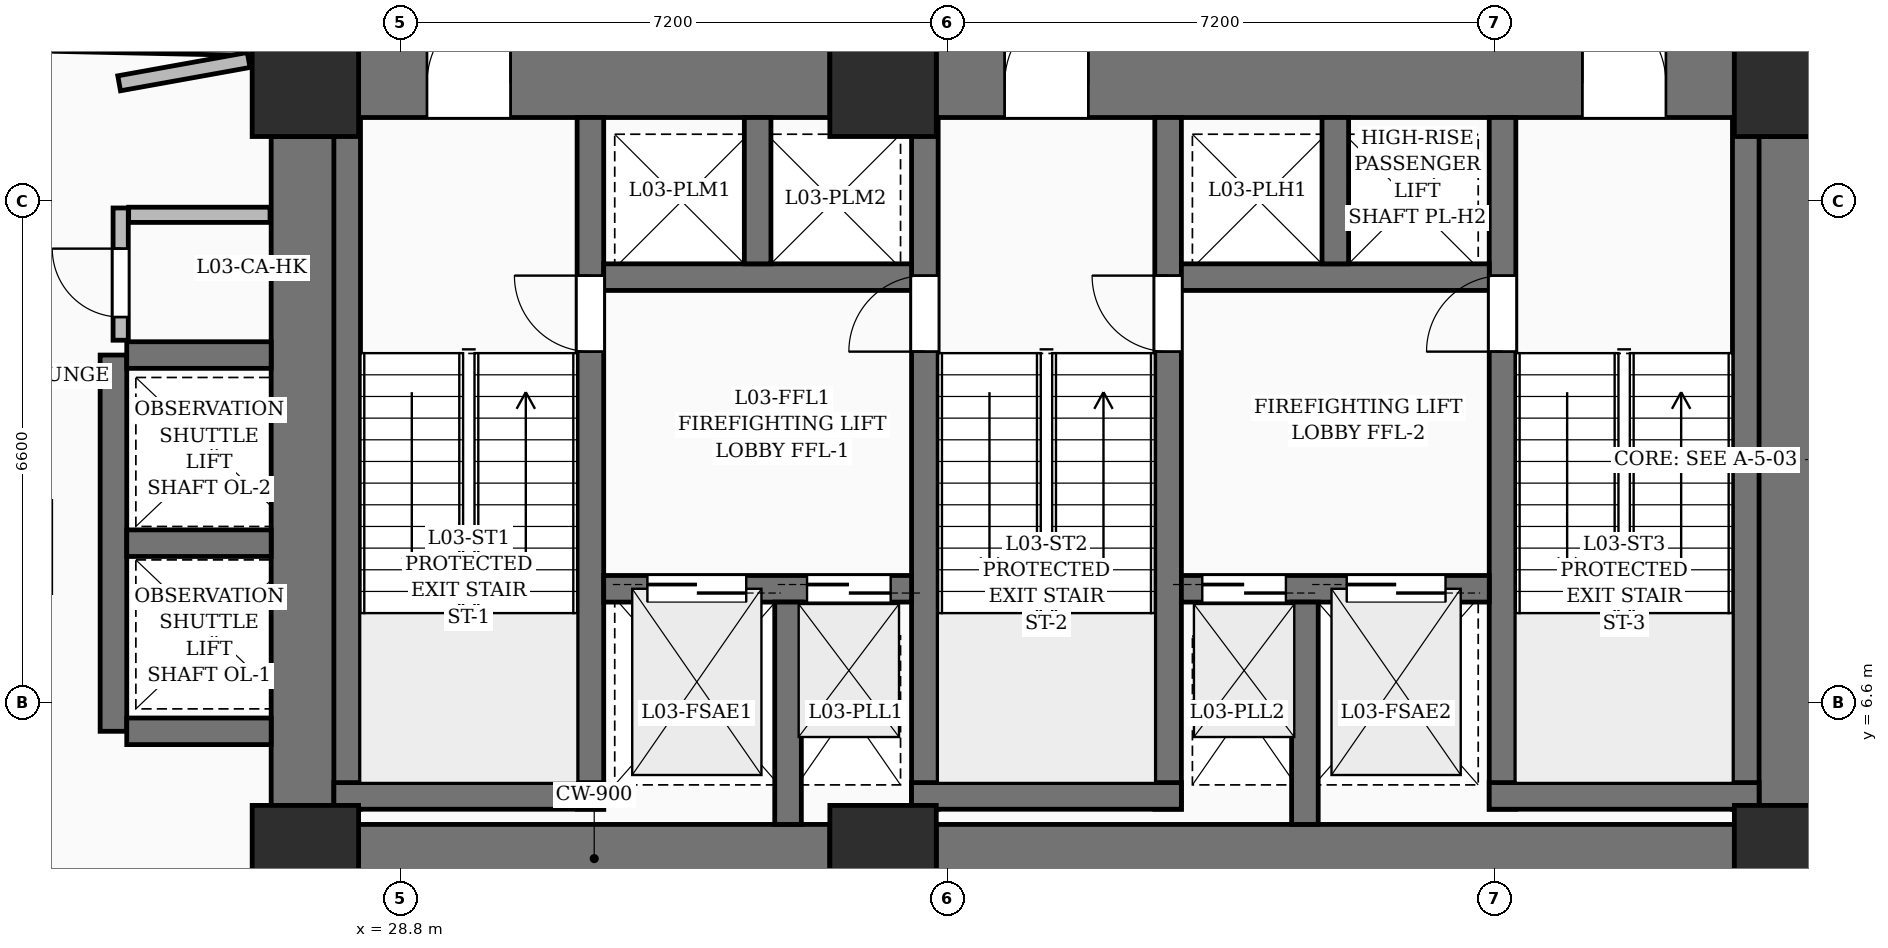
"""IFC4 building model, lengths in metres.
Left out: names, types, materials, properties, quantities, classifications, styles, units other than length and angle.
Written with IfcOpenShell. Run it as: python <this file> out.ifc"""

import sys

from ifc_helpers import new_model, si_unit, direction, frame, frame_2d, origin, origin_2d, place, context, subcontext, project, spatial, rectangle, extrude, element, fill, save


model = new_model("IFC4")
c1 = context("Model", 3, precision=1e-05, world=origin(), true_north=direction((0.0, 1.0)))
c2 = subcontext(c1, "Body", "Model", "MODEL_VIEW")
j1 = project(units=[si_unit("LENGTHUNIT", "METRE"), si_unit("PLANEANGLEUNIT", "RADIAN")], contexts=[c1])
p1 = place(None, origin())
s1 = spatial("IfcSite", under=j1, at=p1, CompositionType="ELEMENT")
p2 = place(p1, origin())
s2 = spatial("IfcBuilding", under=s1, at=p2, CompositionType="ELEMENT")
p3 = place(p2, frame((0.0, 0.0, 17.4)))
s3 = spatial("IfcBuildingStorey", under=s2, at=p3, CompositionType="ELEMENT", Elevation=17.4)
for number, where, z_axis, x_axis in (
    (1, (27.55, 4.55, 0.0), (0.0, 0.0, 1.0), (1.0, 0.0, 0.0)),
    (2, (35.15, 4.55, 0.0), (0.0, 0.0, 1.0), (1.0, 0.0, 0.0)),
    (3, (47.05, 4.55, 0.0), (0.0, 0.0, 1.0), (1.0, 0.0, 0.0)),
    (4, (27.55, 14.75, 0.0), (0.0, 0.0, 1.0), (1.0, 0.0, 0.0)),
    (5, (35.15, 14.75, 0.0), (0.0, 0.0, 1.0), (1.0, 0.0, 0.0)),
    (6, (47.05, 14.75, 0.0), (0.0, 0.0, 1.0), (1.0, 0.0, 0.0)),
):
    element("IfcColumn", number, at=place(p3, frame(where, z_axis=z_axis, x_axis=x_axis)), inside=s3, PredefinedType="COLUMN", context=c2, shape_type="SweptSolid", body=[
        extrude(rectangle(XDim=1.4, YDim=1.4, at=origin_2d()), origin(), (0.0, 0.0, 1.0), 4.5),
    ])
p4 = place(p3, frame((28.25, 4.55, 0.0), z_axis=(0.0, 0.0, 1.0), x_axis=(1.0, 0.0, 0.0)))
e7 = element("IfcWall", 7, at=p4, inside=s3, PredefinedType="SHEAR", context=c2, shape_type="SweptSolid", body=[
    extrude(rectangle(XDim=6.2, YDim=0.9, at=frame_2d((3.1, 0.0))), origin(), (0.0, 0.0, 1.0), 4.5),
])
p5 = place(p3, frame((35.85, 4.55, 0.0), z_axis=(0.0, 0.0, 1.0), x_axis=(1.0, 0.0, 0.0)))
e8 = element("IfcWall", 8, at=p5, inside=s3, PredefinedType="SHEAR", context=c2, shape_type="SweptSolid", body=[
    extrude(rectangle(XDim=10.5, YDim=0.9, at=frame_2d((5.25, 0.0))), origin(), (0.0, 0.0, 1.0), 4.5),
])
p6 = place(p3, frame((28.25, 14.75, 0.0), z_axis=(0.0, 0.0, 1.0), x_axis=(1.0, 0.0, 0.0)))
e9 = element("IfcWall", 9, at=p6, inside=s3, PredefinedType="SHEAR", context=c2, shape_type="SweptSolid", body=[
    extrude(rectangle(XDim=6.2, YDim=0.9, at=frame_2d((3.1, 0.0))), origin(), (0.0, 0.0, 1.0), 4.5),
])
p7 = place(p6, frame((0.9, 0.0, 0.0)))
e10 = element("IfcOpeningElement", 10, at=p7, cuts=e9, PredefinedType="OPENING", context=c2, shape_type="SweptSolid", body=[
    extrude(rectangle(XDim=1.1, YDim=2.2, at=frame_2d((0.55, 1.1))), frame((0.0, 0.46, 0.0), z_axis=(0.0, -1.0, 0.0), x_axis=(1.0, 0.0, 0.0)), (0.0, 0.0, 1.0), 0.92),
])
p8 = place(p3, frame((35.85, 14.75, 0.0), z_axis=(0.0, 0.0, 1.0), x_axis=(1.0, 0.0, 0.0)))
e11 = element("IfcWall", 11, at=p8, inside=s3, PredefinedType="SHEAR", context=c2, shape_type="SweptSolid", body=[
    extrude(rectangle(XDim=10.5, YDim=0.9, at=frame_2d((5.25, 0.0))), origin(), (0.0, 0.0, 1.0), 4.5),
])
p9 = place(p8, frame((0.9, 0.0, 0.0)))
e12 = element("IfcOpeningElement", 12, at=p9, cuts=e11, PredefinedType="OPENING", context=c2, shape_type="SweptSolid", body=[
    extrude(rectangle(XDim=1.1, YDim=2.2, at=frame_2d((0.55, 1.1))), frame((0.0, 0.46, 0.0), z_axis=(0.0, -1.0, 0.0), x_axis=(1.0, 0.0, 0.0)), (0.0, 0.0, 1.0), 0.92),
])
p10 = place(p8, frame((8.5, 0.0, 0.0)))
e13 = element("IfcOpeningElement", 13, at=p10, cuts=e11, PredefinedType="OPENING", context=c2, shape_type="SweptSolid", body=[
    extrude(rectangle(XDim=1.1, YDim=2.2, at=frame_2d((0.55, 1.1))), frame((0.0, 0.46, 0.0), z_axis=(0.0, -1.0, 0.0), x_axis=(1.0, 0.0, 0.0)), (0.0, 0.0, 1.0), 0.92),
])
for number, where, z_axis, x_axis in (
    (14, (27.55, 5.25, 0.0), (0.0, 0.0, 1.0), (0.0, 1.0, 0.0)),
    (15, (47.05, 5.25, 0.0), (0.0, 0.0, 1.0), (0.0, 1.0, 0.0)),
):
    element("IfcWall", number, at=place(p3, frame(where, z_axis=z_axis, x_axis=x_axis)), inside=s3, PredefinedType="SHEAR", context=c2, shape_type="SweptSolid", body=[
        extrude(rectangle(XDim=8.8, YDim=0.9, at=frame_2d((4.4, 0.0))), origin(), (0.0, 0.0, 1.0), 4.5),
    ])
p11 = place(p3, frame((28.1, 5.2, 0.0), z_axis=(0.0, 0.0, 1.0), x_axis=(0.0, 1.0, 0.0)))
e16 = element("IfcWall", 16, at=p11, inside=s3, PredefinedType="SOLIDWALL", context=c2, shape_type="SweptSolid", body=[
    extrude(rectangle(XDim=9.1, YDim=0.35, at=frame_2d((4.55, 0.0))), origin(), (0.0, 0.0, 1.0), 4.5),
])
p12 = place(p3, frame((31.3, 5.2, 0.0), z_axis=(0.0, 0.0, 1.0), x_axis=(0.0, 1.0, 0.0)))
e17 = element("IfcWall", 17, at=p12, inside=s3, PredefinedType="SOLIDWALL", context=c2, shape_type="SweptSolid", body=[
    extrude(rectangle(XDim=9.1, YDim=0.35, at=frame_2d((4.55, 0.0))), origin(), (0.0, 0.0, 1.0), 4.5),
])
p13 = place(p12, frame((6.02, 0.0, 0.0)))
e18 = element("IfcOpeningElement", 18, at=p13, cuts=e17, PredefinedType="OPENING", context=c2, shape_type="SweptSolid", body=[
    extrude(rectangle(XDim=1.0, YDim=2.15, at=frame_2d((0.5, 1.075))), frame((0.0, 0.185, 0.0), z_axis=(0.0, -1.0, 0.0), x_axis=(1.0, 0.0, 0.0)), (0.0, 0.0, 1.0), 0.37),
])
p14 = place(p3, frame((27.925, 5.375, 0.0), z_axis=(0.0, 0.0, 1.0), x_axis=(1.0, 0.0, 0.0)))
e19 = element("IfcWall", 19, at=p14, inside=s3, PredefinedType="SOLIDWALL", context=c2, shape_type="SweptSolid", body=[
    extrude(rectangle(XDim=3.55, YDim=0.35, at=frame_2d((1.775, 0.0))), origin(), (0.0, 0.0, 1.0), 4.5),
])
p15 = place(p3, frame((35.7, 5.2, 0.0), z_axis=(0.0, 0.0, 1.0), x_axis=(0.0, 1.0, 0.0)))
e20 = element("IfcWall", 20, at=p15, inside=s3, PredefinedType="SOLIDWALL", context=c2, shape_type="SweptSolid", body=[
    extrude(rectangle(XDim=9.1, YDim=0.35, at=frame_2d((4.55, 0.0))), origin(), (0.0, 0.0, 1.0), 4.5),
])
p16 = place(p15, frame((6.02, 0.0, 0.0)))
e21 = element("IfcOpeningElement", 21, at=p16, cuts=e20, PredefinedType="OPENING", context=c2, shape_type="SweptSolid", body=[
    extrude(rectangle(XDim=1.0, YDim=2.15, at=frame_2d((0.5, 1.075))), frame((0.0, 0.185, 0.0), z_axis=(0.0, -1.0, 0.0), x_axis=(1.0, 0.0, 0.0)), (0.0, 0.0, 1.0), 0.37),
])
p17 = place(p3, frame((38.9, 5.2, 0.0), z_axis=(0.0, 0.0, 1.0), x_axis=(0.0, 1.0, 0.0)))
e22 = element("IfcWall", 22, at=p17, inside=s3, PredefinedType="SOLIDWALL", context=c2, shape_type="SweptSolid", body=[
    extrude(rectangle(XDim=9.1, YDim=0.35, at=frame_2d((4.55, 0.0))), origin(), (0.0, 0.0, 1.0), 4.5),
])
p18 = place(p17, frame((6.02, 0.0, 0.0)))
e23 = element("IfcOpeningElement", 23, at=p18, cuts=e22, PredefinedType="OPENING", context=c2, shape_type="SweptSolid", body=[
    extrude(rectangle(XDim=1.0, YDim=2.15, at=frame_2d((0.5, 1.075))), frame((0.0, 0.185, 0.0), z_axis=(0.0, -1.0, 0.0), x_axis=(1.0, 0.0, 0.0)), (0.0, 0.0, 1.0), 0.37),
])
p19 = place(p3, frame((35.525, 5.375, 0.0), z_axis=(0.0, 0.0, 1.0), x_axis=(1.0, 0.0, 0.0)))
e24 = element("IfcWall", 24, at=p19, inside=s3, PredefinedType="SOLIDWALL", context=c2, shape_type="SweptSolid", body=[
    extrude(rectangle(XDim=3.55, YDim=0.35, at=frame_2d((1.775, 0.0))), origin(), (0.0, 0.0, 1.0), 4.5),
])
p20 = place(p3, frame((43.3, 5.2, 0.0), z_axis=(0.0, 0.0, 1.0), x_axis=(0.0, 1.0, 0.0)))
e25 = element("IfcWall", 25, at=p20, inside=s3, PredefinedType="SOLIDWALL", context=c2, shape_type="SweptSolid", body=[
    extrude(rectangle(XDim=9.1, YDim=0.35, at=frame_2d((4.55, 0.0))), origin(), (0.0, 0.0, 1.0), 4.5),
])
p21 = place(p20, frame((6.02, 0.0, 0.0)))
e26 = element("IfcOpeningElement", 26, at=p21, cuts=e25, PredefinedType="OPENING", context=c2, shape_type="SweptSolid", body=[
    extrude(rectangle(XDim=1.0, YDim=2.15, at=frame_2d((0.5, 1.075))), frame((0.0, 0.185, 0.0), z_axis=(0.0, -1.0, 0.0), x_axis=(1.0, 0.0, 0.0)), (0.0, 0.0, 1.0), 0.37),
])
p22 = place(p3, frame((46.5, 5.2, 0.0), z_axis=(0.0, 0.0, 1.0), x_axis=(0.0, 1.0, 0.0)))
e27 = element("IfcWall", 27, at=p22, inside=s3, PredefinedType="SOLIDWALL", context=c2, shape_type="SweptSolid", body=[
    extrude(rectangle(XDim=9.1, YDim=0.35, at=frame_2d((4.55, 0.0))), origin(), (0.0, 0.0, 1.0), 4.5),
])
p23 = place(p3, frame((43.125, 5.375, 0.0), z_axis=(0.0, 0.0, 1.0), x_axis=(1.0, 0.0, 0.0)))
e28 = element("IfcWall", 28, at=p23, inside=s3, PredefinedType="SOLIDWALL", context=c2, shape_type="SweptSolid", body=[
    extrude(rectangle(XDim=3.55, YDim=0.35, at=frame_2d((1.775, 0.0))), origin(), (0.0, 0.0, 1.0), 4.5),
])
p24 = place(p3, frame((31.475, 8.1, 0.0), z_axis=(0.0, 0.0, 1.0), x_axis=(1.0, 0.0, 0.0)))
e29 = element("IfcWall", 29, at=p24, inside=s3, PredefinedType="SOLIDWALL", context=c2, shape_type="SweptSolid", body=[
    extrude(rectangle(XDim=4.05, YDim=0.35, at=frame_2d((2.025, 0.0))), origin(), (0.0, 0.0, 1.0), 4.5),
])
p25 = place(p24, frame((0.575, 0.0, 0.0)))
e30 = element("IfcOpeningElement", 30, at=p25, cuts=e29, PredefinedType="OPENING", context=c2, shape_type="SweptSolid", body=[
    extrude(rectangle(XDim=1.3, YDim=2.25, at=frame_2d((0.65, 1.125))), frame((0.0, 0.185, 0.0), z_axis=(0.0, -1.0, 0.0), x_axis=(1.0, 0.0, 0.0)), (0.0, 0.0, 1.0), 0.37),
])
p26 = place(p24, frame((2.675, 0.0, 0.0)))
e31 = element("IfcOpeningElement", 31, at=p26, cuts=e29, PredefinedType="OPENING", context=c2, shape_type="SweptSolid", body=[
    extrude(rectangle(XDim=1.1, YDim=2.2, at=frame_2d((0.55, 1.1))), frame((0.0, 0.185, 0.0), z_axis=(0.0, -1.0, 0.0), x_axis=(1.0, 0.0, 0.0)), (0.0, 0.0, 1.0), 0.37),
])
p27 = place(p3, frame((39.075, 8.1, 0.0), z_axis=(0.0, 0.0, 1.0), x_axis=(1.0, 0.0, 0.0)))
e32 = element("IfcWall", 32, at=p27, inside=s3, PredefinedType="SOLIDWALL", context=c2, shape_type="SweptSolid", body=[
    extrude(rectangle(XDim=4.05, YDim=0.35, at=frame_2d((2.025, 0.0))), origin(), (0.0, 0.0, 1.0), 4.5),
])
p28 = place(p27, frame((2.175, 0.0, 0.0)))
e33 = element("IfcOpeningElement", 33, at=p28, cuts=e32, PredefinedType="OPENING", context=c2, shape_type="SweptSolid", body=[
    extrude(rectangle(XDim=1.3, YDim=2.25, at=frame_2d((0.65, 1.125))), frame((0.0, 0.185, 0.0), z_axis=(0.0, -1.0, 0.0), x_axis=(1.0, 0.0, 0.0)), (0.0, 0.0, 1.0), 0.37),
])
p29 = place(p27, frame((0.275, 0.0, 0.0)))
e34 = element("IfcOpeningElement", 34, at=p29, cuts=e32, PredefinedType="OPENING", context=c2, shape_type="SweptSolid", body=[
    extrude(rectangle(XDim=1.1, YDim=2.2, at=frame_2d((0.55, 1.1))), frame((0.0, 0.185, 0.0), z_axis=(0.0, -1.0, 0.0), x_axis=(1.0, 0.0, 0.0)), (0.0, 0.0, 1.0), 0.37),
])
for number, where, z_axis, x_axis in (
    (35, (33.9, 5.0, 0.0), (0.0, 0.0, 1.0), (0.0, 1.0, 0.0)),
    (36, (40.7, 5.0, 0.0), (0.0, 0.0, 1.0), (0.0, 1.0, 0.0)),
):
    element("IfcWall", number, at=place(p3, frame(where, z_axis=z_axis, x_axis=x_axis)), inside=s3, PredefinedType="SOLIDWALL", context=c2, shape_type="SweptSolid", body=[
        extrude(rectangle(XDim=2.925, YDim=0.35, at=frame_2d((1.462, 0.0))), origin(), (0.0, 0.0, 1.0), 4.5),
    ])
p30 = place(p3, frame((31.475, 12.2, 0.0), z_axis=(0.0, 0.0, 1.0), x_axis=(1.0, 0.0, 0.0)))
e37 = element("IfcWall", 37, at=p30, inside=s3, PredefinedType="SOLIDWALL", context=c2, shape_type="SweptSolid", body=[
    extrude(rectangle(XDim=4.05, YDim=0.35, at=frame_2d((2.025, 0.0))), origin(), (0.0, 0.0, 1.0), 4.5),
])
p31 = place(p3, frame((33.5, 12.375, 0.0), z_axis=(0.0, 0.0, 1.0), x_axis=(0.0, 1.0, 0.0)))
e38 = element("IfcWall", 38, at=p31, inside=s3, PredefinedType="SOLIDWALL", context=c2, shape_type="SweptSolid", body=[
    extrude(rectangle(XDim=1.925, YDim=0.35, at=frame_2d((0.962, 0.0))), origin(), (0.0, 0.0, 1.0), 4.5),
])
p32 = place(p3, frame((39.075, 12.2, 0.0), z_axis=(0.0, 0.0, 1.0), x_axis=(1.0, 0.0, 0.0)))
e39 = element("IfcWall", 39, at=p32, inside=s3, PredefinedType="SOLIDWALL", context=c2, shape_type="SweptSolid", body=[
    extrude(rectangle(XDim=4.05, YDim=0.35, at=frame_2d((2.025, 0.0))), origin(), (0.0, 0.0, 1.0), 4.5),
])
p33 = place(p3, frame((41.1, 12.375, 0.0), z_axis=(0.0, 0.0, 1.0), x_axis=(0.0, 1.0, 0.0)))
e40 = element("IfcWall", 40, at=p33, inside=s3, PredefinedType="SOLIDWALL", context=c2, shape_type="SweptSolid", body=[
    extrude(rectangle(XDim=1.925, YDim=0.35, at=frame_2d((0.962, 0.0))), origin(), (0.0, 0.0, 1.0), 4.5),
])
p34 = place(p3, frame((25.025, 6.225, 0.0), z_axis=(0.0, 0.0, 1.0), x_axis=(0.0, 1.0, 0.0)))
e41 = element("IfcWall", 41, at=p34, inside=s3, PredefinedType="SOLIDWALL", context=c2, shape_type="SweptSolid", body=[
    extrude(rectangle(XDim=4.95, YDim=0.35, at=frame_2d((2.475, 0.0))), origin(), (0.0, 0.0, 1.0), 4.5),
])
for number, where, z_axis, x_axis in (
    (42, (25.2, 6.225, 0.0), (0.0, 0.0, 1.0), (1.0, 0.0, 0.0)),
    (43, (25.2, 8.7, 0.0), (0.0, 0.0, 1.0), (1.0, 0.0, 0.0)),
    (44, (25.2, 11.175, 0.0), (0.0, 0.0, 1.0), (1.0, 0.0, 0.0)),
):
    element("IfcWall", number, at=place(p3, frame(where, z_axis=z_axis, x_axis=x_axis)), inside=s3, PredefinedType="SOLIDWALL", context=c2, shape_type="SweptSolid", body=[
        extrude(rectangle(XDim=1.9, YDim=0.35, at=frame_2d((0.95, 0.0))), origin(), (0.0, 0.0, 1.0), 4.5),
    ])
p35 = place(p3, frame((25.12, 11.37, 0.0), z_axis=(0.0, 0.0, 1.0), x_axis=(0.0, 1.0, 0.0)))
e45 = element("IfcWall", 45, at=p35, inside=s3, PredefinedType="PARTITIONING", context=c2, shape_type="SweptSolid", body=[
    extrude(rectangle(XDim=1.74, YDim=0.2, at=frame_2d((0.87, 0.0))), origin(), (0.0, 0.0, 1.0), 4.2),
])
p36 = place(p35, frame((0.305, 0.0, 0.0)))
e46 = element("IfcOpeningElement", 46, at=p36, cuts=e45, PredefinedType="OPENING", context=c2, shape_type="SweptSolid", body=[
    extrude(rectangle(XDim=0.9, YDim=2.1, at=frame_2d((0.45, 1.05))), frame((0.0, 0.11, 0.0), z_axis=(0.0, -1.0, 0.0), x_axis=(1.0, 0.0, 0.0)), (0.0, 0.0, 1.0), 0.22),
])
p37 = place(p3, frame((25.225, 13.02, 0.0), z_axis=(0.0, 0.0, 1.0), x_axis=(1.0, 0.0, 0.0)))
e47 = element("IfcWall", 47, at=p37, inside=s3, PredefinedType="PARTITIONING", context=c2, shape_type="SweptSolid", body=[
    extrude(rectangle(XDim=1.86, YDim=0.2, at=frame_2d((0.93, 0.0))), origin(), (0.0, 0.0, 1.0), 4.2),
])
p38 = place(p3, frame((20.5, 15.35, 0.0), z_axis=(0.0, 0.0, 1.0), x_axis=(0.999776475021, -0.021142374394, 0.0)))
e48 = element("IfcWall", 48, at=p38, inside=s3, PredefinedType="PARTITIONING", context=c2, shape_type="SweptSolid", body=[
    extrude(rectangle(XDim=7.102, YDim=0.2, at=frame_2d((3.551, 0.0))), origin(), (0.0, 0.0, 1.0), 3.078),
])
p39 = place(p38, frame((3.101, 0.0, 0.0)))
e49 = element("IfcOpeningElement", 49, at=p39, cuts=e48, PredefinedType="OPENING", context=c2, shape_type="SweptSolid", body=[
    extrude(rectangle(XDim=0.9, YDim=2.1, at=frame_2d((0.45, 1.05))), frame((0.0, 0.11, 0.0), z_axis=(0.0, -1.0, 0.0), x_axis=(1.0, 0.0, 0.0)), (0.0, 0.0, 1.0), 0.22),
])
p40 = place(p3, frame((25.1, 14.75, 0.0), z_axis=(0.0, 0.0, 1.0), x_axis=(0.984164140642, 0.177259539302, 0.0)))
e50 = element("IfcWall", 50, at=p40, inside=s3, PredefinedType="PARTITIONING", context=c2, shape_type="SweptSolid", body=[
    extrude(rectangle(XDim=1.731, YDim=0.2, at=frame_2d((0.866, 0.0))), origin(), (0.0, 0.0, 1.0), 3.078),
])
p41 = place(p7, origin())
e51 = element("IfcDoor", 51, at=p41, inside=s3, OperationType="SINGLE_SWING_RIGHT", PredefinedType="DOOR", context=c2, shape_type="SweptSolid", body=[
    extrude(rectangle(XDim=1.1, YDim=2.2, at=frame_2d((0.55, 1.1))), frame((0.0, 0.025, 0.0), z_axis=(0.0, -1.0, 0.0), x_axis=(1.0, 0.0, 0.0)), (0.0, 0.0, 1.0), 0.05),
])
fill(e10, e51)
p42 = place(p9, origin())
e52 = element("IfcDoor", 52, at=p42, inside=s3, OperationType="SINGLE_SWING_RIGHT", PredefinedType="DOOR", context=c2, shape_type="SweptSolid", body=[
    extrude(rectangle(XDim=1.1, YDim=2.2, at=frame_2d((0.55, 1.1))), frame((0.0, 0.025, 0.0), z_axis=(0.0, -1.0, 0.0), x_axis=(1.0, 0.0, 0.0)), (0.0, 0.0, 1.0), 0.05),
])
fill(e12, e52)
p43 = place(p10, origin())
e53 = element("IfcDoor", 53, at=p43, inside=s3, OperationType="SINGLE_SWING_LEFT", PredefinedType="DOOR", context=c2, shape_type="SweptSolid", body=[
    extrude(rectangle(XDim=1.1, YDim=2.2, at=frame_2d((0.55, 1.1))), frame((0.0, 0.025, 0.0), z_axis=(0.0, -1.0, 0.0), x_axis=(1.0, 0.0, 0.0)), (0.0, 0.0, 1.0), 0.05),
])
fill(e13, e53)
p44 = place(p13, origin())
e54 = element("IfcDoor", 54, at=p44, inside=s3, OperationType="SINGLE_SWING_RIGHT", PredefinedType="DOOR", context=c2, shape_type="SweptSolid", body=[
    extrude(rectangle(XDim=1.0, YDim=2.15, at=frame_2d((0.5, 1.075))), frame((0.0, 0.025, 0.0), z_axis=(0.0, -1.0, 0.0), x_axis=(1.0, 0.0, 0.0)), (0.0, 0.0, 1.0), 0.05),
])
fill(e18, e54)
p45 = place(p16, origin())
e55 = element("IfcDoor", 55, at=p45, inside=s3, OperationType="SINGLE_SWING_LEFT", PredefinedType="DOOR", context=c2, shape_type="SweptSolid", body=[
    extrude(rectangle(XDim=1.0, YDim=2.15, at=frame_2d((0.5, 1.075))), frame((0.0, 0.025, 0.0), z_axis=(0.0, -1.0, 0.0), x_axis=(1.0, 0.0, 0.0)), (0.0, 0.0, 1.0), 0.05),
])
fill(e21, e55)
p46 = place(p18, origin())
e56 = element("IfcDoor", 56, at=p46, inside=s3, OperationType="SINGLE_SWING_RIGHT", PredefinedType="DOOR", context=c2, shape_type="SweptSolid", body=[
    extrude(rectangle(XDim=1.0, YDim=2.15, at=frame_2d((0.5, 1.075))), frame((0.0, 0.025, 0.0), z_axis=(0.0, -1.0, 0.0), x_axis=(1.0, 0.0, 0.0)), (0.0, 0.0, 1.0), 0.05),
])
fill(e23, e56)
p47 = place(p21, origin())
e57 = element("IfcDoor", 57, at=p47, inside=s3, OperationType="SINGLE_SWING_LEFT", PredefinedType="DOOR", context=c2, shape_type="SweptSolid", body=[
    extrude(rectangle(XDim=1.0, YDim=2.15, at=frame_2d((0.5, 1.075))), frame((0.0, 0.025, 0.0), z_axis=(0.0, -1.0, 0.0), x_axis=(1.0, 0.0, 0.0)), (0.0, 0.0, 1.0), 0.05),
])
fill(e26, e57)
p48 = place(p25, origin())
e58 = element("IfcDoor", 58, at=p48, inside=s3, OperationType="DOUBLE_DOOR_SLIDING", PredefinedType="DOOR", context=c2, shape_type="SweptSolid", body=[
    extrude(rectangle(XDim=1.3, YDim=2.25, at=frame_2d((0.65, 1.125))), frame((0.0, 0.025, 0.0), z_axis=(0.0, -1.0, 0.0), x_axis=(1.0, 0.0, 0.0)), (0.0, 0.0, 1.0), 0.05),
])
fill(e30, e58)
p49 = place(p28, origin())
e59 = element("IfcDoor", 59, at=p49, inside=s3, OperationType="DOUBLE_DOOR_SLIDING", PredefinedType="DOOR", context=c2, shape_type="SweptSolid", body=[
    extrude(rectangle(XDim=1.3, YDim=2.25, at=frame_2d((0.65, 1.125))), frame((0.0, 0.025, 0.0), z_axis=(0.0, -1.0, 0.0), x_axis=(1.0, 0.0, 0.0)), (0.0, 0.0, 1.0), 0.05),
])
fill(e33, e59)
p50 = place(p26, origin())
e60 = element("IfcDoor", 60, at=p50, inside=s3, OperationType="DOUBLE_DOOR_SLIDING", PredefinedType="DOOR", context=c2, shape_type="SweptSolid", body=[
    extrude(rectangle(XDim=1.1, YDim=2.2, at=frame_2d((0.55, 1.1))), frame((0.0, 0.025, 0.0), z_axis=(0.0, -1.0, 0.0), x_axis=(1.0, 0.0, 0.0)), (0.0, 0.0, 1.0), 0.05),
])
fill(e31, e60)
p51 = place(p29, origin())
e61 = element("IfcDoor", 61, at=p51, inside=s3, OperationType="DOUBLE_DOOR_SLIDING", PredefinedType="DOOR", context=c2, shape_type="SweptSolid", body=[
    extrude(rectangle(XDim=1.1, YDim=2.2, at=frame_2d((0.55, 1.1))), frame((0.0, 0.025, 0.0), z_axis=(0.0, -1.0, 0.0), x_axis=(1.0, 0.0, 0.0)), (0.0, 0.0, 1.0), 0.05),
])
fill(e34, e61)
p52 = place(p36, origin())
e62 = element("IfcDoor", 62, at=p52, inside=s3, OperationType="SINGLE_SWING_RIGHT", PredefinedType="DOOR", context=c2, shape_type="SweptSolid", body=[
    extrude(rectangle(XDim=0.9, YDim=2.1, at=frame_2d((0.45, 1.05))), frame((0.0, 0.025, 0.0), z_axis=(0.0, -1.0, 0.0), x_axis=(1.0, 0.0, 0.0)), (0.0, 0.0, 1.0), 0.05),
])
fill(e46, e62)
save(model, sys.argv[1])
